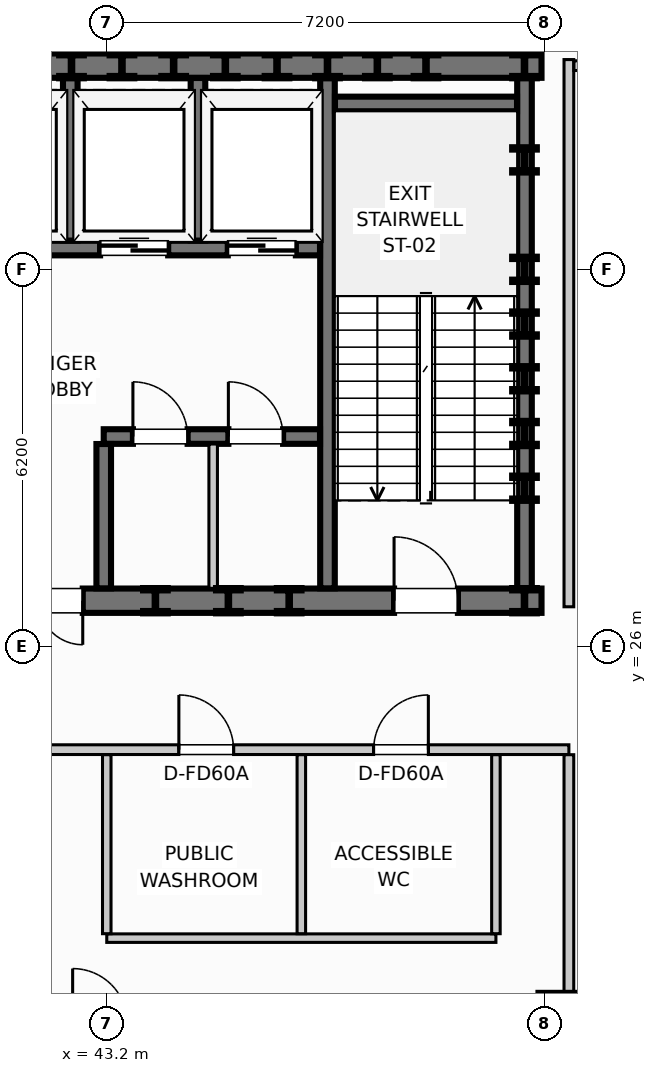
"""IFC4 building model, lengths in metres.
Left out: names, types, materials, properties, quantities, classifications, styles, units other than length and angle.
Written with IfcOpenShell. Run it as: python <this file> out.ifc"""

import sys

from ifc_helpers import new_model, si_unit, direction, frame, frame_2d, origin, origin_2d, place, context, subcontext, project, spatial, rectangle, i_section, extrude, element, fill, save


model = new_model("IFC4")
c1 = context("Model", 3, precision=1e-05, world=origin(), true_north=direction((0.0, 1.0)))
c2 = subcontext(c1, "Body", "Model", "MODEL_VIEW")
j1 = project(units=[si_unit("LENGTHUNIT", "METRE"), si_unit("PLANEANGLEUNIT", "RADIAN")], contexts=[c1])
p1 = place(None, origin())
s1 = spatial("IfcSite", under=j1, at=p1, CompositionType="ELEMENT")
p2 = place(p1, origin())
s2 = spatial("IfcBuilding", under=s1, at=p2, CompositionType="ELEMENT")
p3 = place(p2, frame((0.0, 0.0, 200.35)))
s3 = spatial("IfcBuildingStorey", under=s2, at=p3, CompositionType="ELEMENT", Elevation=200.35)
for number, where, z_axis, x_axis in (
    (1, (43.45, 35.55, 0.0), (0.0, 0.0, 1.0), (1.0, 0.0, 0.0)),
    (2, (45.15, 35.55, 0.0), (0.0, 0.0, 1.0), (1.0, 0.0, 0.0)),
    (3, (46.83, 35.55, 0.0), (0.0, 0.0, 1.0), (1.0, 0.0, 0.0)),
    (4, (48.45, 35.55, 0.0), (0.0, 0.0, 1.0), (1.0, 0.0, 0.0)),
    (5, (50.07, 35.55, 0.0), (0.0, 0.0, 1.0), (1.0, 0.0, 0.0)),
    (6, (45.2, 26.75, 0.0), (0.0, 0.0, 1.0), (1.0, 0.0, 0.0)),
    (7, (50.07, 26.75, 0.0), (0.0, 0.0, 1.0), (1.0, 0.0, 0.0)),
    (8, (50.07, 28.6, 0.0), (0.0, 0.0, 1.0), (1.0, 0.0, 0.0)),
    (9, (50.07, 30.4, 0.0), (0.0, 0.0, 1.0), (1.0, 0.0, 0.0)),
    (10, (50.07, 32.2, 0.0), (0.0, 0.0, 1.0), (1.0, 0.0, 0.0)),
    (11, (50.07, 34.0, 0.0), (0.0, 0.0, 1.0), (1.0, 0.0, 0.0)),
    (12, (42.62, 35.55, 0.0), (0.0, 0.0, 1.0), (1.0, 0.0, 0.0)),
    (13, (47.65, 35.55, 0.0), (0.0, 0.0, 1.0), (1.0, 0.0, 0.0)),
    (14, (44.3, 35.55, 0.0), (0.0, 0.0, 1.0), (1.0, 0.0, 0.0)),
    (15, (46.0, 35.55, 0.0), (0.0, 0.0, 1.0), (1.0, 0.0, 0.0)),
    (16, (50.07, 29.5, 0.0), (0.0, 0.0, 1.0), (1.0, 0.0, 0.0)),
    (17, (50.07, 31.3, 0.0), (0.0, 0.0, 1.0), (1.0, 0.0, 0.0)),
    (18, (44.0, 26.75, 0.0), (0.0, 0.0, 1.0), (1.0, 0.0, 0.0)),
    (19, (46.2, 26.75, 0.0), (0.0, 0.0, 1.0), (1.0, 0.0, 0.0)),
):
    element("IfcColumn", number, at=place(p3, frame(where, z_axis=z_axis, x_axis=x_axis)), inside=s3, PredefinedType="COLUMN", context=c2, shape_type="SweptSolid", body=[
        extrude(i_section(OverallWidth=0.406, OverallDepth=0.416, WebThickness=0.024, FlangeThickness=0.039, at=origin_2d()), origin(), (0.0, 0.0, 1.0), 4.5),
    ])
p4 = place(p3, frame((21.65, 26.75, 0.0), z_axis=(0.0, 0.0, 1.0), x_axis=(1.0, 0.0, 0.0)))
e20 = element("IfcWall", 20, at=p4, inside=s3, PredefinedType="SHEAR", context=c2, shape_type="SweptSolid", body=[
    extrude(rectangle(XDim=28.7, YDim=0.4, at=frame_2d((14.35, 0.0))), origin(), (0.0, 0.0, 1.0), 4.5),
])
p5 = place(p4, frame((1.375, 0.0, 0.0)))
e21 = element("IfcOpeningElement", 21, at=p5, cuts=e20, PredefinedType="OPENING", context=c2, shape_type="SweptSolid", body=[
    extrude(rectangle(XDim=1.05, YDim=2.0, at=frame_2d((0.525, 1.0))), frame((0.0, 0.21, 0.0), z_axis=(0.0, -1.0, 0.0), x_axis=(1.0, 0.0, 0.0)), (0.0, 0.0, 1.0), 0.42),
])
p6 = place(p4, frame((5.375, 0.0, 0.0)))
e22 = element("IfcOpeningElement", 22, at=p6, cuts=e20, PredefinedType="OPENING", context=c2, shape_type="SweptSolid", body=[
    extrude(rectangle(XDim=1.05, YDim=2.0, at=frame_2d((0.525, 1.0))), frame((0.0, 0.21, 0.0), z_axis=(0.0, -1.0, 0.0), x_axis=(1.0, 0.0, 0.0)), (0.0, 0.0, 1.0), 0.42),
])
p7 = place(p4, frame((9.575, 0.0, 0.0)))
e23 = element("IfcOpeningElement", 23, at=p7, cuts=e20, PredefinedType="OPENING", context=c2, shape_type="SweptSolid", body=[
    extrude(rectangle(XDim=1.05, YDim=2.0, at=frame_2d((0.525, 1.0))), frame((0.0, 0.21, 0.0), z_axis=(0.0, -1.0, 0.0), x_axis=(1.0, 0.0, 0.0)), (0.0, 0.0, 1.0), 0.42),
])
p8 = place(p4, frame((19.705, 0.0, 0.0)))
e24 = element("IfcOpeningElement", 24, at=p8, cuts=e20, PredefinedType="OPENING", context=c2, shape_type="SweptSolid", body=[
    extrude(rectangle(XDim=1.45, YDim=2.0, at=frame_2d((0.725, 1.0))), frame((0.0, 0.21, 0.0), z_axis=(0.0, -1.0, 0.0), x_axis=(1.0, 0.0, 0.0)), (0.0, 0.0, 1.0), 0.42),
])
p9 = place(p4, frame((26.275, 0.0, 0.0)))
e25 = element("IfcOpeningElement", 25, at=p9, cuts=e20, PredefinedType="OPENING", context=c2, shape_type="SweptSolid", body=[
    extrude(rectangle(XDim=1.05, YDim=2.0, at=frame_2d((0.525, 1.0))), frame((0.0, 0.21, 0.0), z_axis=(0.0, -1.0, 0.0), x_axis=(1.0, 0.0, 0.0)), (0.0, 0.0, 1.0), 0.42),
])
p10 = place(p3, frame((50.35, 35.55, 0.0), z_axis=(0.0, 0.0, 1.0), x_axis=(-1.0, 0.0, 0.0)))
e26 = element("IfcWall", 26, at=p10, inside=s3, PredefinedType="SHEAR", context=c2, shape_type="SweptSolid", body=[
    extrude(rectangle(XDim=28.7, YDim=0.4, at=frame_2d((14.35, 0.0))), origin(), (0.0, 0.0, 1.0), 4.5),
])
for number, where, z_axis, x_axis in (
    (27, (50.07, 26.953, 0.0), (0.0, 0.0, 1.0), (0.0, 1.0, 0.0)),
    (28, (46.83, 26.953, 0.0), (0.0, 0.0, 1.0), (0.0, 1.0, 0.0)),
):
    element("IfcWall", number, at=place(p3, frame(where, z_axis=z_axis, x_axis=x_axis)), inside=s3, PredefinedType="SHEAR", context=c2, shape_type="SweptSolid", body=[
        extrude(rectangle(XDim=8.394, YDim=0.24, at=frame_2d((4.197, 0.0))), origin(), (0.0, 0.0, 1.0), 4.5),
    ])
p11 = place(p3, frame((46.953, 34.92, 0.0), z_axis=(0.0, 0.0, 1.0), x_axis=(1.0, 0.0, 0.0)))
e29 = element("IfcWall", 29, at=p11, inside=s3, PredefinedType="SHEAR", context=c2, shape_type="SweptSolid", body=[
    extrude(rectangle(XDim=2.994, YDim=0.24, at=frame_2d((1.497, 0.0))), origin(), (0.0, 0.0, 1.0), 4.5),
])
p12 = place(p3, frame((33.493, 32.55, 0.0), z_axis=(0.0, 0.0, 1.0), x_axis=(1.0, 0.0, 0.0)))
e30 = element("IfcWall", 30, at=p12, inside=s3, PredefinedType="SHEAR", context=c2, shape_type="SweptSolid", body=[
    extrude(rectangle(XDim=13.214, YDim=0.24, at=frame_2d((6.607, 0.0))), origin(), (0.0, 0.0, 1.0), 4.5),
])
p13 = place(p12, frame((1.557, 0.0, 0.0)))
e31 = element("IfcOpeningElement", 31, at=p13, cuts=e30, PredefinedType="OPENING", context=c2, shape_type="SweptSolid", body=[
    extrude(rectangle(XDim=0.9, YDim=2.0, at=frame_2d((0.45, 1.0))), frame((0.0, 0.13, 0.0), z_axis=(0.0, -1.0, 0.0), x_axis=(1.0, 0.0, 0.0)), (0.0, 0.0, 1.0), 0.26),
])
p14 = place(p12, frame((4.737, 0.0, 0.0)))
e32 = element("IfcOpeningElement", 32, at=p14, cuts=e30, PredefinedType="OPENING", context=c2, shape_type="SweptSolid", body=[
    extrude(rectangle(XDim=0.9, YDim=2.0, at=frame_2d((0.45, 1.0))), frame((0.0, 0.13, 0.0), z_axis=(0.0, -1.0, 0.0), x_axis=(1.0, 0.0, 0.0)), (0.0, 0.0, 1.0), 0.26),
])
p15 = place(p12, frame((7.497, 0.0, 0.0)))
e33 = element("IfcOpeningElement", 33, at=p15, cuts=e30, PredefinedType="OPENING", context=c2, shape_type="SweptSolid", body=[
    extrude(rectangle(XDim=1.12, YDim=2.0, at=frame_2d((0.56, 1.0))), frame((0.0, 0.13, 0.0), z_axis=(0.0, -1.0, 0.0), x_axis=(1.0, 0.0, 0.0)), (0.0, 0.0, 1.0), 0.26),
])
p16 = place(p12, frame((9.597, 0.0, 0.0)))
e34 = element("IfcOpeningElement", 34, at=p16, cuts=e30, PredefinedType="OPENING", context=c2, shape_type="SweptSolid", body=[
    extrude(rectangle(XDim=1.12, YDim=2.0, at=frame_2d((0.56, 1.0))), frame((0.0, 0.13, 0.0), z_axis=(0.0, -1.0, 0.0), x_axis=(1.0, 0.0, 0.0)), (0.0, 0.0, 1.0), 0.26),
])
p17 = place(p12, frame((11.697, 0.0, 0.0)))
e35 = element("IfcOpeningElement", 35, at=p17, cuts=e30, PredefinedType="OPENING", context=c2, shape_type="SweptSolid", body=[
    extrude(rectangle(XDim=1.12, YDim=2.0, at=frame_2d((0.56, 1.0))), frame((0.0, 0.13, 0.0), z_axis=(0.0, -1.0, 0.0), x_axis=(1.0, 0.0, 0.0)), (0.0, 0.0, 1.0), 0.26),
])
p18 = place(p3, frame((43.15, 29.45, 0.0), z_axis=(0.0, 0.0, 1.0), x_axis=(1.0, 0.0, 0.0)))
e36 = element("IfcWall", 36, at=p18, inside=s3, PredefinedType="SHEAR", context=c2, shape_type="SweptSolid", body=[
    extrude(rectangle(XDim=3.557, YDim=0.24, at=frame_2d((1.779, 0.0))), origin(), (0.0, 0.0, 1.0), 4.5),
])
p19 = place(p18, frame((0.48, 0.0, 0.0)))
e37 = element("IfcOpeningElement", 37, at=p19, cuts=e36, PredefinedType="OPENING", context=c2, shape_type="SweptSolid", body=[
    extrude(rectangle(XDim=0.9, YDim=2.0, at=frame_2d((0.45, 1.0))), frame((0.0, 0.13, 0.0), z_axis=(0.0, -1.0, 0.0), x_axis=(1.0, 0.0, 0.0)), (0.0, 0.0, 1.0), 0.26),
])
p20 = place(p18, frame((2.05, 0.0, 0.0)))
e38 = element("IfcOpeningElement", 38, at=p20, cuts=e36, PredefinedType="OPENING", context=c2, shape_type="SweptSolid", body=[
    extrude(rectangle(XDim=0.9, YDim=2.0, at=frame_2d((0.45, 1.0))), frame((0.0, 0.13, 0.0), z_axis=(0.0, -1.0, 0.0), x_axis=(1.0, 0.0, 0.0)), (0.0, 0.0, 1.0), 0.26),
])
p21 = place(p3, frame((43.15, 26.953, 0.0), z_axis=(0.0, 0.0, 1.0), x_axis=(0.0, 1.0, 0.0)))
e39 = element("IfcWall", 39, at=p21, inside=s3, PredefinedType="SHEAR", context=c2, shape_type="SweptSolid", body=[
    extrude(rectangle(XDim=2.374, YDim=0.24, at=frame_2d((1.187, 0.0))), origin(), (0.0, 0.0, 1.0), 4.5),
])
for number, where, z_axis, x_axis in (
    (40, (42.6, 32.673, 0.0), (0.0, 0.0, 1.0), (0.0, 1.0, 0.0)),
    (41, (44.7, 32.673, 0.0), (0.0, 0.0, 1.0), (0.0, 1.0, 0.0)),
):
    element("IfcWall", number, at=place(p3, frame(where, z_axis=z_axis, x_axis=x_axis)), inside=s3, PredefinedType="SHEAR", context=c2, shape_type="SweptSolid", body=[
        extrude(rectangle(XDim=2.674, YDim=0.24, at=frame_2d((1.337, 0.0))), origin(), (0.0, 0.0, 1.0), 4.5),
    ])
p22 = place(p3, frame((44.95, 26.953, 0.0), z_axis=(0.0, 0.0, 1.0), x_axis=(0.0, 1.0, 0.0)))
e42 = element("IfcWall", 42, at=p22, inside=s3, PredefinedType="PARTITIONING", context=c2, shape_type="SweptSolid", body=[
    extrude(rectangle(XDim=2.374, YDim=0.14, at=frame_2d((1.187, 0.0))), origin(), (0.0, 0.0, 1.0), 4.245),
])
p23 = place(p3, frame((21.2, 24.3, 0.0), z_axis=(0.0, 0.0, 1.0), x_axis=(1.0, 0.0, 0.0)))
e43 = element("IfcWall", 43, at=p23, inside=s3, PredefinedType="PARTITIONING", context=c2, shape_type="SweptSolid", body=[
    extrude(rectangle(XDim=29.6, YDim=0.16, at=frame_2d((14.8, 0.0))), origin(), (0.0, 0.0, 1.0), 4.245),
])
p24 = place(p23, frame((19.54, 0.0, 0.0)))
e44 = element("IfcOpeningElement", 44, at=p24, cuts=e43, PredefinedType="OPENING", context=c2, shape_type="SweptSolid", body=[
    extrude(rectangle(XDim=0.9, YDim=2.0, at=frame_2d((0.45, 1.0))), frame((0.0, 0.09, 0.0), z_axis=(0.0, -1.0, 0.0), x_axis=(1.0, 0.0, 0.0)), (0.0, 0.0, 1.0), 0.18),
])
p25 = place(p23, frame((26.389, 0.0, 0.0)))
e45 = element("IfcOpeningElement", 45, at=p25, cuts=e43, PredefinedType="OPENING", context=c2, shape_type="SweptSolid", body=[
    extrude(rectangle(XDim=0.9, YDim=2.0, at=frame_2d((0.45, 1.0))), frame((0.0, 0.09, 0.0), z_axis=(0.0, -1.0, 0.0), x_axis=(1.0, 0.0, 0.0)), (0.0, 0.0, 1.0), 0.18),
])
p26 = place(p23, frame((23.186, 0.0, 0.0)))
e46 = element("IfcOpeningElement", 46, at=p26, cuts=e43, PredefinedType="OPENING", context=c2, shape_type="SweptSolid", body=[
    extrude(rectangle(XDim=0.9, YDim=2.0, at=frame_2d((0.45, 1.0))), frame((0.0, 0.09, 0.0), z_axis=(0.0, -1.0, 0.0), x_axis=(1.0, 0.0, 0.0)), (0.0, 0.0, 1.0), 0.18),
])
p27 = place(p3, frame((43.2, 21.2, 0.0), z_axis=(0.0, 0.0, 1.0), x_axis=(1.0, 0.0, 0.0)))
e47 = element("IfcWall", 47, at=p27, inside=s3, PredefinedType="PARTITIONING", context=c2, shape_type="SweptSolid", body=[
    extrude(rectangle(XDim=6.4, YDim=0.14, at=frame_2d((3.2, 0.0))), origin(), (0.0, 0.0, 1.0), 4.245),
])
for number, where, z_axis, x_axis in (
    (48, (46.4, 21.273, 0.0), (0.0, 0.0, 1.0), (0.0, 1.0, 0.0)),
    (49, (43.2, 21.273, 0.0), (0.0, 0.0, 1.0), (0.0, 1.0, 0.0)),
    (50, (49.6, 21.273, 0.0), (0.0, 0.0, 1.0), (0.0, 1.0, 0.0)),
):
    element("IfcWall", number, at=place(p3, frame(where, z_axis=z_axis, x_axis=x_axis)), inside=s3, PredefinedType="PARTITIONING", context=c2, shape_type="SweptSolid", body=[
        extrude(rectangle(XDim=2.944, YDim=0.14, at=frame_2d((1.472, 0.0))), origin(), (0.0, 0.0, 1.0), 4.245),
    ])
p28 = place(p3, frame((50.8, 19.883, 0.0), z_axis=(0.0, 0.0, 1.0), x_axis=(0.0, 1.0, 0.0)))
e51 = element("IfcWall", 51, at=p28, inside=s3, PredefinedType="PARTITIONING", context=c2, shape_type="SweptSolid", body=[
    extrude(rectangle(XDim=4.334, YDim=0.16, at=frame_2d((2.167, 0.0))), origin(), (0.0, 0.0, 1.0), 4.245),
])
p29 = place(p3, frame((50.8, 26.65, 0.0), z_axis=(0.0, 0.0, 1.0), x_axis=(0.0, 1.0, 0.0)))
e52 = element("IfcWall", 52, at=p29, inside=s3, PredefinedType="PARTITIONING", context=c2, shape_type="SweptSolid", body=[
    extrude(rectangle(XDim=9.0, YDim=0.16, at=frame_2d((4.5, 0.0))), origin(), (0.0, 0.0, 1.0), 4.245),
])
p30 = place(p3, frame((50.883, 35.55, 0.0), z_axis=(0.0, 0.0, 1.0), x_axis=(1.0, 0.0, 0.0)))
e53 = element("IfcWall", 53, at=p30, inside=s3, PredefinedType="PARTITIONING", context=c2, shape_type="SweptSolid", body=[
    extrude(rectangle(XDim=2.234, YDim=0.16, at=frame_2d((1.117, 0.0))), origin(), (0.0, 0.0, 1.0), 4.245),
])
p31 = place(p19, origin())
e54 = element("IfcDoor", 54, at=p31, inside=s3, OperationType="SINGLE_SWING_LEFT", PredefinedType="DOOR", context=c2, shape_type="SweptSolid", body=[
    extrude(rectangle(XDim=0.9, YDim=2.0, at=frame_2d((0.45, 1.0))), frame((0.0, 0.025, 0.0), z_axis=(0.0, -1.0, 0.0), x_axis=(1.0, 0.0, 0.0)), (0.0, 0.0, 1.0), 0.05),
])
fill(e37, e54)
p32 = place(p20, origin())
e55 = element("IfcDoor", 55, at=p32, inside=s3, OperationType="SINGLE_SWING_LEFT", PredefinedType="DOOR", context=c2, shape_type="SweptSolid", body=[
    extrude(rectangle(XDim=0.9, YDim=2.0, at=frame_2d((0.45, 1.0))), frame((0.0, 0.025, 0.0), z_axis=(0.0, -1.0, 0.0), x_axis=(1.0, 0.0, 0.0)), (0.0, 0.0, 1.0), 0.05),
])
fill(e38, e55)
p33 = place(p8, frame((1.45, 0.0, 0.0), z_axis=(0.0, 0.0, 1.0), x_axis=(-1.0, 0.0, 0.0)))
e56 = element("IfcDoor", 56, at=p33, inside=s3, OperationType="DOUBLE_DOOR_SINGLE_SWING", PredefinedType="DOOR", context=c2, shape_type="SweptSolid", body=[
    extrude(rectangle(XDim=1.45, YDim=2.0, at=frame_2d((0.725, 1.0))), frame((0.0, 0.025, 0.0), z_axis=(0.0, -1.0, 0.0), x_axis=(1.0, 0.0, 0.0)), (0.0, 0.0, 1.0), 0.05),
])
fill(e24, e56)
p34 = place(p9, origin())
e57 = element("IfcDoor", 57, at=p34, inside=s3, OperationType="SINGLE_SWING_LEFT", PredefinedType="DOOR", context=c2, shape_type="SweptSolid", body=[
    extrude(rectangle(XDim=1.05, YDim=2.0, at=frame_2d((0.525, 1.0))), frame((0.0, 0.025, 0.0), z_axis=(0.0, -1.0, 0.0), x_axis=(1.0, 0.0, 0.0)), (0.0, 0.0, 1.0), 0.05),
])
fill(e25, e57)
p35 = place(p16, origin())
e58 = element("IfcDoor", 58, at=p35, inside=s3, OperationType="DOUBLE_DOOR_SLIDING", PredefinedType="USERDEFINED", context=c2, shape_type="SweptSolid", body=[
    extrude(rectangle(XDim=1.12, YDim=2.0, at=frame_2d((0.56, 1.0))), frame((0.0, 0.025, 0.0), z_axis=(0.0, -1.0, 0.0), x_axis=(1.0, 0.0, 0.0)), (0.0, 0.0, 1.0), 0.05),
])
fill(e34, e58)
p36 = place(p17, origin())
e59 = element("IfcDoor", 59, at=p36, inside=s3, OperationType="DOUBLE_DOOR_SLIDING", PredefinedType="USERDEFINED", context=c2, shape_type="SweptSolid", body=[
    extrude(rectangle(XDim=1.12, YDim=2.0, at=frame_2d((0.56, 1.0))), frame((0.0, 0.025, 0.0), z_axis=(0.0, -1.0, 0.0), x_axis=(1.0, 0.0, 0.0)), (0.0, 0.0, 1.0), 0.05),
])
fill(e35, e59)
p37 = place(p25, origin())
e60 = element("IfcDoor", 60, at=p37, inside=s3, OperationType="SINGLE_SWING_RIGHT", PredefinedType="DOOR", context=c2, shape_type="SweptSolid", body=[
    extrude(rectangle(XDim=0.9, YDim=2.0, at=frame_2d((0.45, 1.0))), frame((0.0, 0.025, 0.0), z_axis=(0.0, -1.0, 0.0), x_axis=(1.0, 0.0, 0.0)), (0.0, 0.0, 1.0), 0.05),
])
fill(e45, e60)
p38 = place(p26, origin())
e61 = element("IfcDoor", 61, at=p38, inside=s3, OperationType="SINGLE_SWING_LEFT", PredefinedType="DOOR", context=c2, shape_type="SweptSolid", body=[
    extrude(rectangle(XDim=0.9, YDim=2.0, at=frame_2d((0.45, 1.0))), frame((0.0, 0.025, 0.0), z_axis=(0.0, -1.0, 0.0), x_axis=(1.0, 0.0, 0.0)), (0.0, 0.0, 1.0), 0.05),
])
fill(e46, e61)
save(model, sys.argv[1])
